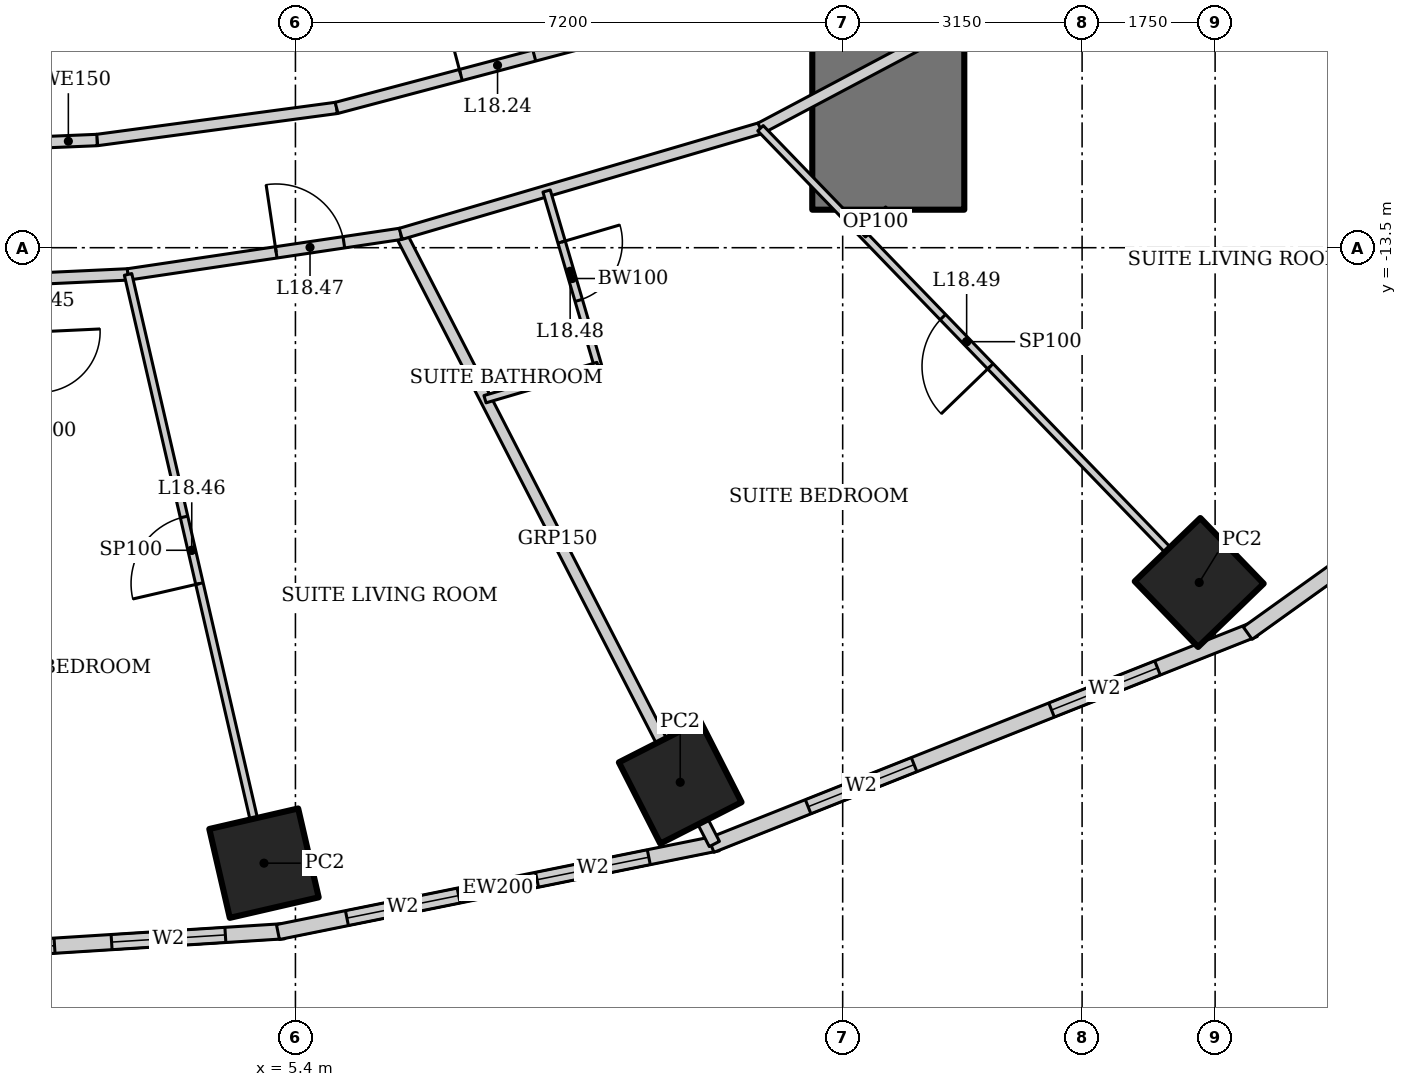
"""IFC4 building model, lengths in metres.
Left out: names, types, materials, properties, quantities, classifications, styles, units other than length and angle.
Written with IfcOpenShell. Run it as: python <this file> out.ifc"""

import sys

from ifc_helpers import new_model, si_unit, direction, frame, frame_2d, origin, origin_2d, place, context, subcontext, project, spatial, rectangle, hollow_rectangle, extrude, element, fill, save


model = new_model("IFC4")
c1 = context("Model", 3, precision=1e-05, world=origin(), true_north=direction((0.0, 1.0)))
c2 = subcontext(c1, "Body", "Model", "MODEL_VIEW")
j1 = project(units=[si_unit("LENGTHUNIT", "METRE"), si_unit("PLANEANGLEUNIT", "RADIAN")], contexts=[c1])
p1 = place(None, origin())
s1 = spatial("IfcSite", under=j1, at=p1, CompositionType="ELEMENT")
p2 = place(p1, origin())
s2 = spatial("IfcBuilding", under=s1, at=p2, CompositionType="ELEMENT")
p3 = place(p2, frame((0.0, 0.0, 80.2)))
s3 = spatial("IfcBuildingStorey", under=s2, at=p3, CompositionType="ELEMENT", Elevation=80.2)
for number, where, z_axis, x_axis in (
    (1, (4.986, -21.598, 0.0), (0.0, 0.0, 1.0), (0.974, 0.225, 0.0)),
    (2, (10.463, -20.534, 0.0), (0.0, 0.0, 1.0), (0.891, 0.454, 0.0)),
    (3, (17.291, -17.905, 0.0), (0.0, 0.0, 1.0), (0.719, 0.695, 0.0)),
):
    element("IfcColumn", number, at=place(p3, frame(where, z_axis=z_axis, x_axis=x_axis)), inside=s3, PredefinedType="COLUMN", context=c2, shape_type="SweptSolid", body=[
        extrude(hollow_rectangle(XDim=1.2, YDim=1.2, WallThickness=0.1, at=origin_2d()), origin(), (0.0, 0.0, 1.0), 3.6),
    ])
p4 = place(p3, frame((13.2, -13.0, 0.0), z_axis=(0.0, 0.0, 1.0), x_axis=(0.0, 1.0, 0.0)))
e4 = element("IfcWall", 4, at=p4, inside=s3, PredefinedType="SHEAR", context=c2, shape_type="SweptSolid", body=[
    extrude(rectangle(XDim=26.0, YDim=2.0, at=frame_2d((13.0, 0.0))), origin(), (0.0, 0.0, 1.0), 3.6),
])
p5 = place(p4, frame((12.1, 0.0, 0.0)))
e5 = element("IfcOpeningElement", 5, at=p5, cuts=e4, PredefinedType="OPENING", context=c2, shape_type="SweptSolid", body=[
    extrude(rectangle(XDim=1.8, YDim=2.1, at=frame_2d((0.9, 1.05))), frame((0.0, 1.01, 0.0), z_axis=(0.0, -1.0, 0.0), x_axis=(1.0, 0.0, 0.0)), (0.0, 0.0, 1.0), 2.02),
])
p6 = place(p3, frame((-0.041, -22.827, 0.0), z_axis=(0.0, 0.0, 1.0), x_axis=(0.998018582375, 0.062919863585, 0.0)))
e6 = element("IfcWall", 6, at=p6, inside=s3, PredefinedType="SOLIDWALL", context=c2, shape_type="SweptSolid", body=[
    extrude(rectangle(XDim=5.304, YDim=0.2, at=frame_2d((2.652, 0.0))), origin(), (0.0, 0.0, 1.0), 3.45),
])
p7 = place(p6, frame((0.776, 0.0, 0.5)))
e7 = element("IfcOpeningElement", 7, at=p7, cuts=e6, PredefinedType="OPENING", context=c2, shape_type="SweptSolid", body=[
    extrude(rectangle(XDim=1.5, YDim=2.2, at=frame_2d((0.75, 1.1))), frame((0.0, 0.11, 0.0), z_axis=(0.0, -1.0, 0.0), x_axis=(1.0, 0.0, 0.0)), (0.0, 0.0, 1.0), 0.22),
])
p8 = place(p6, frame((3.028, 0.0, 0.5)))
e8 = element("IfcOpeningElement", 8, at=p8, cuts=e6, PredefinedType="OPENING", context=c2, shape_type="SweptSolid", body=[
    extrude(rectangle(XDim=1.5, YDim=2.2, at=frame_2d((0.75, 1.1))), frame((0.0, 0.11, 0.0), z_axis=(0.0, -1.0, 0.0), x_axis=(1.0, 0.0, 0.0)), (0.0, 0.0, 1.0), 0.22),
])
p9 = place(p3, frame((5.17, -22.504, 0.0), z_axis=(0.0, 0.0, 1.0), x_axis=(0.980251657452, 0.197754110105, 0.0)))
e9 = element("IfcWall", 9, at=p9, inside=s3, PredefinedType="SOLIDWALL", context=c2, shape_type="SweptSolid", body=[
    extrude(rectangle(XDim=5.904, YDim=0.2, at=frame_2d((2.952, 0.0))), origin(), (0.0, 0.0, 1.0), 3.45),
])
p10 = place(p9, frame((0.926, 0.0, 0.5)))
e10 = element("IfcOpeningElement", 10, at=p10, cuts=e9, PredefinedType="OPENING", context=c2, shape_type="SweptSolid", body=[
    extrude(rectangle(XDim=1.5, YDim=2.2, at=frame_2d((0.75, 1.1))), frame((0.0, 0.11, 0.0), z_axis=(0.0, -1.0, 0.0), x_axis=(1.0, 0.0, 0.0)), (0.0, 0.0, 1.0), 0.22),
])
p11 = place(p9, frame((3.478, 0.0, 0.5)))
e11 = element("IfcOpeningElement", 11, at=p11, cuts=e9, PredefinedType="OPENING", context=c2, shape_type="SweptSolid", body=[
    extrude(rectangle(XDim=1.5, YDim=2.2, at=frame_2d((0.75, 1.1))), frame((0.0, 0.11, 0.0), z_axis=(0.0, -1.0, 0.0), x_axis=(1.0, 0.0, 0.0)), (0.0, 0.0, 1.0), 0.22),
])
p12 = place(p3, frame((10.869, -21.363, 0.0), z_axis=(0.0, 0.0, 1.0), x_axis=(0.929358351251, 0.369178892895, 0.0)))
e12 = element("IfcWall", 12, at=p12, inside=s3, PredefinedType="SOLIDWALL", context=c2, shape_type="SweptSolid", body=[
    extrude(rectangle(XDim=7.692, YDim=0.2, at=frame_2d((3.846, 0.0))), origin(), (0.0, 0.0, 1.0), 3.45),
])
p13 = place(p12, frame((1.373, 0.0, 0.5)))
e13 = element("IfcOpeningElement", 13, at=p13, cuts=e12, PredefinedType="OPENING", context=c2, shape_type="SweptSolid", body=[
    extrude(rectangle(XDim=1.5, YDim=2.2, at=frame_2d((0.75, 1.1))), frame((0.0, 0.11, 0.0), z_axis=(0.0, -1.0, 0.0), x_axis=(1.0, 0.0, 0.0)), (0.0, 0.0, 1.0), 0.22),
])
p14 = place(p12, frame((4.819, 0.0, 0.5)))
e14 = element("IfcOpeningElement", 14, at=p14, cuts=e12, PredefinedType="OPENING", context=c2, shape_type="SweptSolid", body=[
    extrude(rectangle(XDim=1.5, YDim=2.2, at=frame_2d((0.75, 1.1))), frame((0.0, 0.11, 0.0), z_axis=(0.0, -1.0, 0.0), x_axis=(1.0, 0.0, 0.0)), (0.0, 0.0, 1.0), 0.22),
])
p15 = place(p3, frame((17.929, -18.572, 0.0), z_axis=(0.0, 0.0, 1.0), x_axis=(0.812791321576, 0.582554948112, 0.0)))
e15 = element("IfcWall", 15, at=p15, inside=s3, PredefinedType="SOLIDWALL", context=c2, shape_type="SweptSolid", body=[
    extrude(rectangle(XDim=8.063, YDim=0.2, at=frame_2d((4.032, 0.0))), origin(), (0.0, 0.0, 1.0), 3.45),
])
p16 = place(p15, frame((1.466, 0.0, 0.5)))
e16 = element("IfcOpeningElement", 16, at=p16, cuts=e15, PredefinedType="OPENING", context=c2, shape_type="SweptSolid", body=[
    extrude(rectangle(XDim=1.5, YDim=2.2, at=frame_2d((0.75, 1.1))), frame((0.0, 0.11, 0.0), z_axis=(0.0, -1.0, 0.0), x_axis=(1.0, 0.0, 0.0)), (0.0, 0.0, 1.0), 0.22),
])
p17 = place(p15, frame((5.097, 0.0, 0.5)))
e17 = element("IfcOpeningElement", 17, at=p17, cuts=e15, PredefinedType="OPENING", context=c2, shape_type="SweptSolid", body=[
    extrude(rectangle(XDim=1.5, YDim=2.2, at=frame_2d((0.75, 1.1))), frame((0.0, 0.11, 0.0), z_axis=(0.0, -1.0, 0.0), x_axis=(1.0, 0.0, 0.0)), (0.0, 0.0, 1.0), 0.22),
])
p18 = place(p3, frame((10.912, -21.346, 0.0), z_axis=(0.0, 0.0, 1.0), x_axis=(-0.457117602022, 0.889406261458, 0.0)))
e18 = element("IfcWall", 18, at=p18, inside=s3, PredefinedType="PARTITIONING", context=c2, shape_type="SweptSolid", body=[
    extrude(rectangle(XDim=9.027, YDim=0.15, at=frame_2d((4.513, 0.0))), origin(), (0.0, 0.0, 1.0), 2.528),
])
p19 = place(p3, frame((0.0, -14.0, 0.0), z_axis=(0.0, 0.0, 1.0), x_axis=(0.998920826789, 0.046445471333, 0.0)))
e19 = element("IfcWall", 19, at=p19, inside=s3, PredefinedType="PARTITIONING", context=c2, shape_type="SweptSolid", body=[
    extrude(rectangle(XDim=3.201, YDim=0.15, at=frame_2d((1.601, 0.0))), origin(), (0.0, 0.0, 1.0), 3.45),
])
p20 = place(p3, frame((3.198, -13.851, 0.0), z_axis=(0.0, 0.0, 1.0), x_axis=(0.989107488999, 0.14719502439, 0.0)))
e20 = element("IfcWall", 20, at=p20, inside=s3, PredefinedType="PARTITIONING", context=c2, shape_type="SweptSolid", body=[
    extrude(rectangle(XDim=3.627, YDim=0.15, at=frame_2d((1.814, 0.0))), origin(), (0.0, 0.0, 1.0), 3.45),
])
p21 = place(p20, frame((1.97, 0.0, 0.0)))
e21 = element("IfcOpeningElement", 21, at=p21, cuts=e20, PredefinedType="OPENING", context=c2, shape_type="SweptSolid", body=[
    extrude(rectangle(XDim=0.9, YDim=2.1, at=frame_2d((0.45, 1.05))), frame((0.0, 0.085, 0.0), z_axis=(0.0, -1.0, 0.0), x_axis=(1.0, 0.0, 0.0)), (0.0, 0.0, 1.0), 0.17),
])
p22 = place(p3, frame((6.786, -13.317, 0.0), z_axis=(0.0, 0.0, 1.0), x_axis=(0.959496227294, 0.281721475589, 0.0)))
e22 = element("IfcWall", 22, at=p22, inside=s3, PredefinedType="PARTITIONING", context=c2, shape_type="SweptSolid", body=[
    extrude(rectangle(XDim=4.933, YDim=0.15, at=frame_2d((2.466, 0.0))), origin(), (0.0, 0.0, 1.0), 3.45),
])
p23 = place(p3, frame((11.519, -11.928, 0.0), z_axis=(0.0, 0.0, 1.0), x_axis=(0.883334368785, 0.468743419071, 0.0)))
e23 = element("IfcWall", 23, at=p23, inside=s3, PredefinedType="PARTITIONING", context=c2, shape_type="SweptSolid", body=[
    extrude(rectangle(XDim=5.491, YDim=0.15, at=frame_2d((2.746, 0.0))), origin(), (0.0, 0.0, 1.0), 3.45),
])
p24 = place(p3, frame((2.79, -12.083, 0.0), z_axis=(0.0, 0.0, 1.0), x_axis=(0.991129053928, 0.13290296633, 0.0)))
e24 = element("IfcWall", 24, at=p24, inside=s3, PredefinedType="PARTITIONING", context=c2, shape_type="SweptSolid", body=[
    extrude(rectangle(XDim=3.18, YDim=0.15, at=frame_2d((1.59, 0.0))), origin(), (0.0, 0.0, 1.0), 3.45),
])
p25 = place(p3, frame((5.941, -11.66, 0.0), z_axis=(0.0, 0.0, 1.0), x_axis=(0.966672790407, 0.256015070428, 0.0)))
e25 = element("IfcWall", 25, at=p25, inside=s3, PredefinedType="PARTITIONING", context=c2, shape_type="SweptSolid", body=[
    extrude(rectangle(XDim=4.382, YDim=0.15, at=frame_2d((2.191, 0.0))), origin(), (0.0, 0.0, 1.0), 3.45),
])
p26 = place(p25, frame((1.691, 0.0, 0.0)))
e26 = element("IfcOpeningElement", 26, at=p26, cuts=e25, PredefinedType="OPENING", context=c2, shape_type="SweptSolid", body=[
    extrude(rectangle(XDim=1.0, YDim=2.1, at=frame_2d((0.5, 1.05))), frame((0.0, 0.085, 0.0), z_axis=(0.0, -1.0, 0.0), x_axis=(1.0, 0.0, 0.0)), (0.0, 0.0, 1.0), 0.17),
])
p27 = place(p3, frame((4.874, -21.111, 0.0), z_axis=(0.0, 0.0, 1.0), x_axis=(-0.224955233595, 0.97436909992, 0.0)))
e27 = element("IfcWall", 27, at=p27, inside=s3, PredefinedType="PARTITIONING", context=c2, shape_type="SweptSolid", body=[
    extrude(rectangle(XDim=7.45, YDim=0.1, at=frame_2d((3.725, 0.0))), origin(), (0.0, 0.0, 1.0), 2.767),
])
p28 = place(p27, frame((3.275, 0.0, 0.0)))
e28 = element("IfcOpeningElement", 28, at=p28, cuts=e27, PredefinedType="OPENING", context=c2, shape_type="SweptSolid", body=[
    extrude(rectangle(XDim=0.9, YDim=2.1, at=frame_2d((0.45, 1.05))), frame((0.0, 0.06, 0.0), z_axis=(0.0, -1.0, 0.0), x_axis=(1.0, 0.0, 0.0)), (0.0, 0.0, 1.0), 0.12),
])
p29 = place(p3, frame((8.705, -12.754, 0.0), z_axis=(0.0, 0.0, 1.0), x_axis=(0.281659633817, -0.959514382736, 0.0)))
e29 = element("IfcWall", 29, at=p29, inside=s3, PredefinedType="PARTITIONING", context=c2, shape_type="SweptSolid", body=[
    extrude(rectangle(XDim=2.4, YDim=0.1, at=frame_2d((1.2, 0.0))), origin(), (0.0, 0.0, 1.0), 3.45),
])
p30 = place(p29, frame((0.7, 0.0, 0.0)))
e30 = element("IfcOpeningElement", 30, at=p30, cuts=e29, PredefinedType="OPENING", context=c2, shape_type="SweptSolid", body=[
    extrude(rectangle(XDim=0.8, YDim=2.1, at=frame_2d((0.4, 1.05))), frame((0.0, 0.06, 0.0), z_axis=(0.0, -1.0, 0.0), x_axis=(1.0, 0.0, 0.0)), (0.0, 0.0, 1.0), 0.12),
])
p31 = place(p3, frame((9.381, -15.057, 0.0), z_axis=(0.0, 0.0, 1.0), x_axis=(-0.959518451093, -0.281645773999, 0.0)))
e31 = element("IfcWall", 31, at=p31, inside=s3, PredefinedType="PARTITIONING", context=c2, shape_type="SweptSolid", body=[
    extrude(rectangle(XDim=1.549, YDim=0.1, at=frame_2d((0.774, 0.0))), origin(), (0.0, 0.0, 1.0), 3.45),
])
p32 = place(p3, frame((16.944, -17.545, 0.0), z_axis=(0.0, 0.0, 1.0), x_axis=(-0.694666479492, 0.719331969448, 0.0)))
e32 = element("IfcWall", 32, at=p32, inside=s3, PredefinedType="PARTITIONING", context=c2, shape_type="SweptSolid", body=[
    extrude(rectangle(XDim=7.81, YDim=0.1, at=frame_2d((3.905, 0.0))), origin(), (0.0, 0.0, 1.0), 2.528),
])
p33 = place(p32, frame((3.455, 0.0, 0.0)))
e33 = element("IfcOpeningElement", 33, at=p33, cuts=e32, PredefinedType="OPENING", context=c2, shape_type="SweptSolid", body=[
    extrude(rectangle(XDim=0.9, YDim=2.1, at=frame_2d((0.45, 1.05))), frame((0.0, 0.06, 0.0), z_axis=(0.0, -1.0, 0.0), x_axis=(1.0, 0.0, 0.0)), (0.0, 0.0, 1.0), 0.12),
])
p34 = place(p3, frame((23.171, -13.24, 0.0), z_axis=(0.0, 0.0, 1.0), x_axis=(-0.868243142124, 0.496138938357, 0.0)))
e34 = element("IfcWall", 34, at=p34, inside=s3, PredefinedType="PARTITIONING", context=c2, shape_type="SweptSolid", body=[
    extrude(rectangle(XDim=7.834, YDim=0.1, at=frame_2d((3.917, 0.0))), origin(), (0.0, 0.0, 1.0), 2.693),
])
p35 = place(p34, frame((3.467, 0.0, 0.0)))
e35 = element("IfcOpeningElement", 35, at=p35, cuts=e34, PredefinedType="OPENING", context=c2, shape_type="SweptSolid", body=[
    extrude(rectangle(XDim=0.9, YDim=2.1, at=frame_2d((0.45, 1.05))), frame((0.0, 0.06, 0.0), z_axis=(0.0, -1.0, 0.0), x_axis=(1.0, 0.0, 0.0)), (0.0, 0.0, 1.0), 0.12),
])
p36 = place(p3, frame((13.2, -13.0, 0.0), z_axis=(0.0, 0.0, 1.0), x_axis=(-0.719347134512, -0.69465077562, 0.0)))
e36 = element("IfcWall", 36, at=p36, inside=s3, PredefinedType="PARTITIONING", context=c2, shape_type="SweptSolid", body=[
    extrude(rectangle(XDim=0.465, YDim=0.1, at=frame_2d((0.232, 0.0))), origin(), (0.0, 0.0, 1.0), 3.45),
])
p37 = place(p3, frame((2.035, -12.115, 0.0), z_axis=(0.0, 0.0, 1.0), x_axis=(0.999116751279, 0.042020439232, 0.0)))
e37 = element("IfcWall", 37, at=p37, inside=s3, PredefinedType="PARTITIONING", context=c2, shape_type="SweptSolid", body=[
    extrude(rectangle(XDim=0.755, YDim=0.15, at=frame_2d((0.378, 0.0))), origin(), (0.0, 0.0, 1.0), 3.45),
])
p38 = place(p7, origin())
e38 = element("IfcWindow", 38, at=p38, inside=s3, PartitioningType="SINGLE_PANEL", PredefinedType="WINDOW", context=c2, shape_type="SweptSolid", body=[
    extrude(rectangle(XDim=1.5, YDim=2.2, at=frame_2d((0.75, 1.1))), frame((0.0, 0.03, 0.0), z_axis=(0.0, -1.0, 0.0), x_axis=(1.0, 0.0, 0.0)), (0.0, 0.0, 1.0), 0.06),
])
fill(e7, e38)
p39 = place(p8, origin())
e39 = element("IfcWindow", 39, at=p39, inside=s3, PartitioningType="SINGLE_PANEL", PredefinedType="WINDOW", context=c2, shape_type="SweptSolid", body=[
    extrude(rectangle(XDim=1.5, YDim=2.2, at=frame_2d((0.75, 1.1))), frame((0.0, 0.03, 0.0), z_axis=(0.0, -1.0, 0.0), x_axis=(1.0, 0.0, 0.0)), (0.0, 0.0, 1.0), 0.06),
])
fill(e8, e39)
p40 = place(p10, origin())
e40 = element("IfcWindow", 40, at=p40, inside=s3, PartitioningType="SINGLE_PANEL", PredefinedType="WINDOW", context=c2, shape_type="SweptSolid", body=[
    extrude(rectangle(XDim=1.5, YDim=2.2, at=frame_2d((0.75, 1.1))), frame((0.0, 0.03, 0.0), z_axis=(0.0, -1.0, 0.0), x_axis=(1.0, 0.0, 0.0)), (0.0, 0.0, 1.0), 0.06),
])
fill(e10, e40)
p41 = place(p11, origin())
e41 = element("IfcWindow", 41, at=p41, inside=s3, PartitioningType="SINGLE_PANEL", PredefinedType="WINDOW", context=c2, shape_type="SweptSolid", body=[
    extrude(rectangle(XDim=1.5, YDim=2.2, at=frame_2d((0.75, 1.1))), frame((0.0, 0.03, 0.0), z_axis=(0.0, -1.0, 0.0), x_axis=(1.0, 0.0, 0.0)), (0.0, 0.0, 1.0), 0.06),
])
fill(e11, e41)
p42 = place(p13, origin())
e42 = element("IfcWindow", 42, at=p42, inside=s3, PartitioningType="SINGLE_PANEL", PredefinedType="WINDOW", context=c2, shape_type="SweptSolid", body=[
    extrude(rectangle(XDim=1.5, YDim=2.2, at=frame_2d((0.75, 1.1))), frame((0.0, 0.03, 0.0), z_axis=(0.0, -1.0, 0.0), x_axis=(1.0, 0.0, 0.0)), (0.0, 0.0, 1.0), 0.06),
])
fill(e13, e42)
p43 = place(p14, origin())
e43 = element("IfcWindow", 43, at=p43, inside=s3, PartitioningType="SINGLE_PANEL", PredefinedType="WINDOW", context=c2, shape_type="SweptSolid", body=[
    extrude(rectangle(XDim=1.5, YDim=2.2, at=frame_2d((0.75, 1.1))), frame((0.0, 0.03, 0.0), z_axis=(0.0, -1.0, 0.0), x_axis=(1.0, 0.0, 0.0)), (0.0, 0.0, 1.0), 0.06),
])
fill(e14, e43)
p44 = place(p26, origin())
e44 = element("IfcDoor", 44, at=p44, inside=s3, OperationType="SINGLE_SWING_LEFT", PredefinedType="DOOR", context=c2, shape_type="SweptSolid", body=[
    extrude(rectangle(XDim=1.0, YDim=2.1, at=frame_2d((0.5, 1.05))), frame((0.0, 0.025, 0.0), z_axis=(0.0, -1.0, 0.0), x_axis=(1.0, 0.0, 0.0)), (0.0, 0.0, 1.0), 0.05),
])
fill(e26, e44)
p45 = place(p28, origin())
e45 = element("IfcDoor", 45, at=p45, inside=s3, OperationType="SINGLE_SWING_LEFT", PredefinedType="DOOR", context=c2, shape_type="SweptSolid", body=[
    extrude(rectangle(XDim=0.9, YDim=2.1, at=frame_2d((0.45, 1.05))), frame((0.0, 0.025, 0.0), z_axis=(0.0, -1.0, 0.0), x_axis=(1.0, 0.0, 0.0)), (0.0, 0.0, 1.0), 0.05),
])
fill(e28, e45)
p46 = place(p21, origin())
e46 = element("IfcDoor", 46, at=p46, inside=s3, OperationType="SINGLE_SWING_LEFT", PredefinedType="DOOR", context=c2, shape_type="SweptSolid", body=[
    extrude(rectangle(XDim=0.9, YDim=2.1, at=frame_2d((0.45, 1.05))), frame((0.0, 0.025, 0.0), z_axis=(0.0, -1.0, 0.0), x_axis=(1.0, 0.0, 0.0)), (0.0, 0.0, 1.0), 0.05),
])
fill(e21, e46)
p47 = place(p30, origin())
e47 = element("IfcDoor", 47, at=p47, inside=s3, OperationType="SINGLE_SWING_LEFT", PredefinedType="DOOR", context=c2, shape_type="SweptSolid", body=[
    extrude(rectangle(XDim=0.8, YDim=2.1, at=frame_2d((0.4, 1.05))), frame((0.0, 0.025, 0.0), z_axis=(0.0, -1.0, 0.0), x_axis=(1.0, 0.0, 0.0)), (0.0, 0.0, 1.0), 0.05),
])
fill(e30, e47)
p48 = place(p33, origin())
e48 = element("IfcDoor", 48, at=p48, inside=s3, OperationType="SINGLE_SWING_LEFT", PredefinedType="DOOR", context=c2, shape_type="SweptSolid", body=[
    extrude(rectangle(XDim=0.9, YDim=2.1, at=frame_2d((0.45, 1.05))), frame((0.0, 0.025, 0.0), z_axis=(0.0, -1.0, 0.0), x_axis=(1.0, 0.0, 0.0)), (0.0, 0.0, 1.0), 0.05),
])
fill(e33, e48)
save(model, sys.argv[1])
